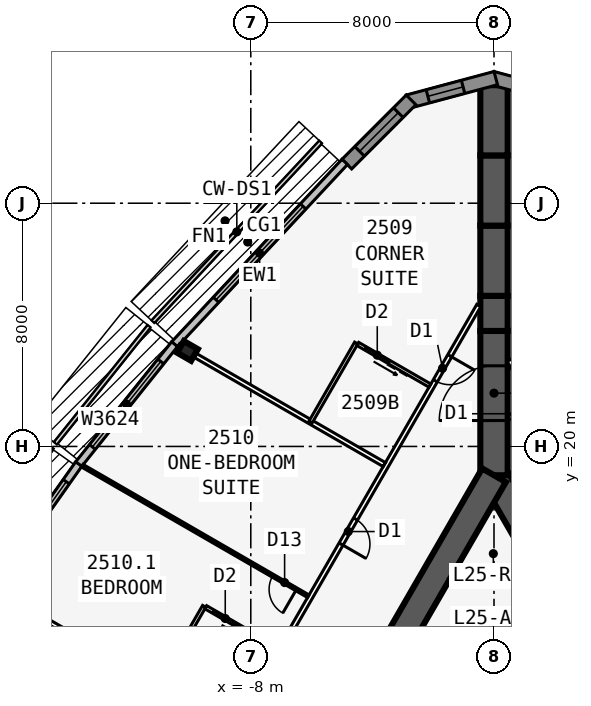
"""IFC4 building model, lengths in metres.
Left out: names, types, materials, properties, quantities, classifications, styles, units other than length and angle.
Written with IfcOpenShell. Run it as: python <this file> out.ifc"""

import sys

from ifc_helpers import new_model, si_unit, direction, frame, frame_2d, origin, origin_2d, place, context, subcontext, project, spatial, polyline, rectangle, i_section, outline, extrude, element, fill, save


model = new_model("IFC4")
c1 = context("Model", 3, precision=1e-05, world=origin(), true_north=direction((0.0, 1.0)))
c2 = subcontext(c1, "Body", "Model", "MODEL_VIEW")
j1 = project(units=[si_unit("LENGTHUNIT", "METRE"), si_unit("PLANEANGLEUNIT", "RADIAN")], contexts=[c1])
p1 = place(None, origin())
s1 = spatial("IfcSite", under=j1, at=p1, CompositionType="ELEMENT")
p2 = place(p1, origin())
s2 = spatial("IfcBuilding", under=s1, at=p2, CompositionType="ELEMENT")
p3 = place(p2, frame((0.0, 0.0, 96.5)))
s3 = spatial("IfcBuildingStorey", under=s2, at=p3, CompositionType="ELEMENT", Elevation=96.5)
p4 = place(p3, frame((16.5, -9.526, 0.0), z_axis=(0.0, 0.0, 1.0), x_axis=(-0.499999749417, 0.866025548458, 0.0)))
e1 = element("IfcWall", 1, at=p4, inside=s3, PredefinedType="SHEAR", context=c2, shape_type="SweptSolid", body=[
    extrude(rectangle(XDim=33.0, YDim=0.9, at=frame_2d((16.5, 0.0))), origin(), (0.0, 0.0, 1.0), 3.4),
])
p5 = place(p4, frame((14.15, 0.0, 0.0)))
e2 = element("IfcOpeningElement", 2, at=p5, cuts=e1, PredefinedType="OPENING", context=c2, shape_type="SweptSolid", body=[
    extrude(rectangle(XDim=1.8, YDim=2.13, at=frame_2d((0.9, 1.065))), frame((0.0, 0.46, 0.0), z_axis=(0.0, -1.0, 0.0), x_axis=(1.0, 0.0, 0.0)), (0.0, 0.0, 1.0), 0.92),
])
p6 = place(p4, frame((12.6, 0.0, 0.0)))
e3 = element("IfcOpeningElement", 3, at=p6, cuts=e1, PredefinedType="OPENING", context=c2, shape_type="SweptSolid", body=[
    extrude(rectangle(XDim=1.0, YDim=2.13, at=frame_2d((0.5, 1.065))), frame((0.0, 0.46, 0.0), z_axis=(0.0, -1.0, 0.0), x_axis=(1.0, 0.0, 0.0)), (0.0, 0.0, 1.0), 0.92),
])
p7 = place(p3, frame((0.0, 19.052, 0.0), z_axis=(0.0, 0.0, 1.0), x_axis=(-0.499999749417, -0.866025548458, 0.0)))
e4 = element("IfcWall", 4, at=p7, inside=s3, PredefinedType="SHEAR", context=c2, shape_type="SweptSolid", body=[
    extrude(rectangle(XDim=33.0, YDim=0.9, at=frame_2d((16.5, 0.0))), origin(), (0.0, 0.0, 1.0), 3.4),
])
p8 = place(p7, frame((14.15, 0.0, 0.0)))
e5 = element("IfcOpeningElement", 5, at=p8, cuts=e4, PredefinedType="OPENING", context=c2, shape_type="SweptSolid", body=[
    extrude(rectangle(XDim=1.8, YDim=2.13, at=frame_2d((0.9, 1.065))), frame((0.0, 0.46, 0.0), z_axis=(0.0, -1.0, 0.0), x_axis=(1.0, 0.0, 0.0)), (0.0, 0.0, 1.0), 0.92),
])
p9 = place(p7, frame((12.6, 0.0, 0.0)))
e6 = element("IfcOpeningElement", 6, at=p9, cuts=e4, PredefinedType="OPENING", context=c2, shape_type="SweptSolid", body=[
    extrude(rectangle(XDim=1.0, YDim=2.13, at=frame_2d((0.5, 1.065))), frame((0.0, 0.46, 0.0), z_axis=(0.0, -1.0, 0.0), x_axis=(1.0, 0.0, 0.0)), (0.0, 0.0, 1.0), 0.92),
])
p10 = place(p3, frame((0.0, 19.052, 0.0), z_axis=(0.0, 0.0, 1.0), x_axis=(0.0, 1.0, 0.0)))
e7 = element("IfcWall", 7, at=p10, inside=s3, PredefinedType="SHEAR", context=c2, shape_type="SweptSolid", body=[
    extrude(rectangle(XDim=4.746, YDim=0.9, at=frame_2d((2.373, 0.0))), origin(), (0.0, 0.0, 1.0), 3.4),
])
p11 = place(p10, frame((1.8, 0.0, 0.0)))
e8 = element("IfcOpeningElement", 8, at=p11, cuts=e7, PredefinedType="OPENING", context=c2, shape_type="SweptSolid", body=[
    extrude(rectangle(XDim=1.8, YDim=2.13, at=frame_2d((0.9, 1.065))), frame((0.0, 0.46, 0.0), z_axis=(0.0, -1.0, 0.0), x_axis=(1.0, 0.0, 0.0)), (0.0, 0.0, 1.0), 0.92),
])
p12 = place(p3, frame((0.0, 23.799, 0.0), z_axis=(0.0, 0.0, 1.0), x_axis=(0.0, 1.0, 0.0)))
e9 = element("IfcWall", 9, at=p12, inside=s3, PredefinedType="SHEAR", context=c2, shape_type="SweptSolid", body=[
    extrude(rectangle(XDim=1.155, YDim=0.9, at=frame_2d((0.577, 0.0))), origin(), (0.0, 0.0, 1.0), 3.4),
])
p13 = place(p3, frame((0.0, 24.953, 0.0), z_axis=(0.0, 0.0, 1.0), x_axis=(0.0, 1.0, 0.0)))
e10 = element("IfcWall", 10, at=p13, inside=s3, PredefinedType="SHEAR", context=c2, shape_type="SweptSolid", body=[
    extrude(rectangle(XDim=2.309, YDim=0.9, at=frame_2d((1.155, 0.0))), origin(), (0.0, 0.0, 1.0), 3.4),
])
p14 = place(p3, frame((0.0, 27.263, 0.0), z_axis=(0.0, 0.0, 1.0), x_axis=(0.0, 1.0, 0.0)))
e11 = element("IfcWall", 11, at=p14, inside=s3, PredefinedType="SHEAR", context=c2, shape_type="SweptSolid", body=[
    extrude(rectangle(XDim=2.31, YDim=0.9, at=frame_2d((1.155, 0.0))), origin(), (0.0, 0.0, 1.0), 3.4),
])
p15 = place(p3, frame((0.0, 29.572, 0.0), z_axis=(0.0, 0.0, 1.0), x_axis=(0.0, 1.0, 0.0)))
e12 = element("IfcWall", 12, at=p15, inside=s3, PredefinedType="SHEAR", context=c2, shape_type="SweptSolid", body=[
    extrude(rectangle(XDim=2.309, YDim=0.9, at=frame_2d((1.155, 0.0))), origin(), (0.0, 0.0, 1.0), 3.4),
])
p16 = place(p3, frame((-10.083, 23.142, 0.0), z_axis=(0.0, 0.0, 1.0), x_axis=(-0.5, -0.866025403784, 0.0)))
e13 = element("IfcColumn", 13, at=p16, inside=s3, PredefinedType="COLUMN", context=c2, shape_type="SweptSolid", body=[
    extrude(i_section(OverallWidth=0.442, OverallDepth=0.531, WebThickness=0.066, FlangeThickness=0.106, at=origin_2d()), origin(), (0.0, 0.0, 1.0), 3.4),
])
p17 = place(p3, frame((2.829, 31.341, 0.0), z_axis=(0.0, 0.0, 1.0), x_axis=(-0.965930548995, 0.258801419081, 0.0)))
e14 = element("IfcWall", 14, at=p17, inside=s3, PredefinedType="SOLIDWALL", context=c2, shape_type="SweptSolid", body=[
    extrude(outline(polyline([(2.989, 0.225), (2.929, 0.225), (2.438, 0.093), (2.402, 0.225), (0.0, 0.225), (0.0, -0.225), (2.989, -0.225), (2.989, 0.225)])), origin(), (0.0, 0.0, 1.0), 3.235),
])
p18 = place(p17, frame((0.676, 0.0, 0.45)))
e15 = element("IfcOpeningElement", 15, at=p18, cuts=e14, PredefinedType="OPENING", context=c2, shape_type="SweptSolid", body=[
    extrude(rectangle(XDim=1.2, YDim=2.4, at=frame_2d((0.6, 1.2))), frame((0.0, 0.235, 0.0), z_axis=(0.0, -1.0, 0.0), x_axis=(1.0, 0.0, 0.0)), (0.0, 0.0, 1.0), 0.47),
])
p19 = place(p3, frame((0.058, 32.114, 0.0), z_axis=(0.0, 0.0, 1.0), x_axis=(-0.965930548995, -0.258801419081, 0.0)))
e16 = element("IfcWall", 16, at=p19, inside=s3, PredefinedType="SOLIDWALL", context=c2, shape_type="SweptSolid", body=[
    extrude(outline(polyline([(2.989, 0.225), (0.586, 0.225), (0.551, 0.093), (0.059, 0.225), (0.0, 0.225), (0.0, -0.225), (2.989, -0.225), (2.989, 0.225)])), origin(), (0.0, 0.0, 1.0), 3.235),
])
p20 = place(p19, frame((1.113, 0.0, 0.45)))
e17 = element("IfcOpeningElement", 17, at=p20, cuts=e16, PredefinedType="OPENING", context=c2, shape_type="SweptSolid", body=[
    extrude(rectangle(XDim=1.2, YDim=2.4, at=frame_2d((0.6, 1.2))), frame((0.0, 0.235, 0.0), z_axis=(0.0, -1.0, 0.0), x_axis=(1.0, 0.0, 0.0)), (0.0, 0.0, 1.0), 0.47),
])
p21 = place(p3, frame((-2.728, 31.399, 0.0), z_axis=(0.0, 0.0, 1.0), x_axis=(-0.707106781187, -0.707106781187, 0.0)))
e18 = element("IfcWall", 18, at=p21, inside=s3, PredefinedType="SOLIDWALL", context=c2, shape_type="SweptSolid", body=[
    extrude(rectangle(XDim=2.988, YDim=0.45, at=frame_2d((1.494, 0.0))), origin(), (0.0, 0.0, 1.0), 3.235),
])
p22 = place(p21, frame((0.594, 0.0, 0.45)))
e19 = element("IfcOpeningElement", 19, at=p22, cuts=e18, PredefinedType="OPENING", context=c2, shape_type="SweptSolid", body=[
    extrude(rectangle(XDim=1.8, YDim=2.4, at=frame_2d((0.9, 1.2))), frame((0.0, 0.235, 0.0), z_axis=(0.0, -1.0, 0.0), x_axis=(1.0, 0.0, 0.0)), (0.0, 0.0, 1.0), 0.47),
])
p23 = place(p3, frame((-4.909, 29.36, 0.0), z_axis=(0.0, 0.0, 1.0), x_axis=(-0.682289646561, -0.731081964075, 0.0)))
e20 = element("IfcWall", 20, at=p23, inside=s3, PredefinedType="STANDARD", context=c2, shape_type="SweptSolid", body=[
    extrude(rectangle(XDim=8.211, YDim=0.25, at=frame_2d((4.105, 0.0))), origin(), (0.0, 0.0, 1.0), 3.235),
])
p24 = place(p23, frame((2.006, 0.0, 0.45)))
e21 = element("IfcOpeningElement", 21, at=p24, cuts=e20, PredefinedType="OPENING", context=c2, shape_type="SweptSolid", body=[
    extrude(rectangle(XDim=4.2, YDim=2.4, at=frame_2d((2.1, 1.2))), frame((0.0, 0.135, 0.0), z_axis=(0.0, -1.0, 0.0), x_axis=(1.0, 0.0, 0.0)), (0.0, 0.0, 1.0), 0.27),
])
p25 = place(p3, frame((-10.505, 23.364, 0.0), z_axis=(0.0, 0.0, 1.0), x_axis=(-0.624594965756, -0.780948864364, 0.0)))
e22 = element("IfcWall", 22, at=p25, inside=s3, PredefinedType="STANDARD", context=c2, shape_type="SweptSolid", body=[
    extrude(rectangle(XDim=5.058, YDim=0.25, at=frame_2d((2.529, 0.0))), origin(), (0.0, 0.0, 1.0), 3.235),
])
p26 = place(p25, frame((0.729, 0.0, 0.45)))
e23 = element("IfcOpeningElement", 23, at=p26, cuts=e22, PredefinedType="OPENING", context=c2, shape_type="SweptSolid", body=[
    extrude(rectangle(XDim=3.6, YDim=2.4, at=frame_2d((1.8, 1.2))), frame((0.0, 0.135, 0.0), z_axis=(0.0, -1.0, 0.0), x_axis=(1.0, 0.0, 0.0)), (0.0, 0.0, 1.0), 0.27),
])
p27 = place(p3, frame((-13.659, 19.42, 0.0), z_axis=(0.0, 0.0, 1.0), x_axis=(-0.5766431066, -0.81699616132, 0.0)))
e24 = element("IfcWall", 24, at=p27, inside=s3, PredefinedType="STANDARD", context=c2, shape_type="SweptSolid", body=[
    extrude(rectangle(XDim=5.021, YDim=0.25, at=frame_2d((2.51, 0.0))), origin(), (0.0, 0.0, 1.0), 3.235),
])
p28 = place(p27, frame((0.71, 0.0, 0.45)))
e25 = element("IfcOpeningElement", 25, at=p28, cuts=e24, PredefinedType="OPENING", context=c2, shape_type="SweptSolid", body=[
    extrude(rectangle(XDim=3.6, YDim=2.4, at=frame_2d((1.8, 1.2))), frame((0.0, 0.135, 0.0), z_axis=(0.0, -1.0, 0.0), x_axis=(1.0, 0.0, 0.0)), (0.0, 0.0, 1.0), 0.27),
])
p29 = place(p3, frame((20.027, -10.985, 0.0), z_axis=(0.0, 0.0, 1.0), x_axis=(-0.500001677587, 0.866024435227, 0.0)))
e26 = element("IfcWall", 26, at=p29, inside=s3, PredefinedType="PARTITIONING", context=c2, shape_type="SweptSolid", body=[
    extrude(rectangle(XDim=39.054, YDim=0.15, at=frame_2d((19.527, 0.0))), origin(), (0.0, 0.0, 1.0), 3.235),
])
p30 = place(p29, frame((1.558, 0.0, 0.0)))
e27 = element("IfcOpeningElement", 27, at=p30, cuts=e26, PredefinedType="OPENING", context=c2, shape_type="SweptSolid", body=[
    extrude(rectangle(XDim=0.95, YDim=2.13, at=frame_2d((0.475, 1.065))), frame((0.0, 0.085, 0.0), z_axis=(0.0, -1.0, 0.0), x_axis=(1.0, 0.0, 0.0)), (0.0, 0.0, 1.0), 0.17),
])
p31 = place(p29, frame((11.552, 0.0, 0.0)))
e28 = element("IfcOpeningElement", 28, at=p31, cuts=e26, PredefinedType="OPENING", context=c2, shape_type="SweptSolid", body=[
    extrude(rectangle(XDim=0.95, YDim=2.13, at=frame_2d((0.475, 1.065))), frame((0.0, 0.085, 0.0), z_axis=(0.0, -1.0, 0.0), x_axis=(1.0, 0.0, 0.0)), (0.0, 0.0, 1.0), 0.17),
])
p32 = place(p29, frame((22.752, 0.0, 0.0)))
e29 = element("IfcOpeningElement", 29, at=p32, cuts=e26, PredefinedType="OPENING", context=c2, shape_type="SweptSolid", body=[
    extrude(rectangle(XDim=0.95, YDim=2.13, at=frame_2d((0.475, 1.065))), frame((0.0, 0.085, 0.0), z_axis=(0.0, -1.0, 0.0), x_axis=(1.0, 0.0, 0.0)), (0.0, 0.0, 1.0), 0.17),
])
p33 = place(p29, frame((36.546, 0.0, 0.0)))
e30 = element("IfcOpeningElement", 30, at=p33, cuts=e26, PredefinedType="OPENING", context=c2, shape_type="SweptSolid", body=[
    extrude(rectangle(XDim=0.95, YDim=2.13, at=frame_2d((0.475, 1.065))), frame((0.0, 0.085, 0.0), z_axis=(0.0, -1.0, 0.0), x_axis=(1.0, 0.0, 0.0)), (0.0, 0.0, 1.0), 0.17),
])
p34 = place(p3, frame((-0.5, 24.636, 0.0), z_axis=(0.0, 0.0, 1.0), x_axis=(-0.500001915564, -0.86602429783, 0.0)))
e31 = element("IfcWall", 31, at=p34, inside=s3, PredefinedType="PARTITIONING", context=c2, shape_type="SweptSolid", body=[
    extrude(rectangle(XDim=42.172, YDim=0.15, at=frame_2d((21.086, 0.0))), origin(), (0.0, 0.0, 1.0), 3.235),
])
p35 = place(p34, frame((1.911, 0.0, 0.0)))
e32 = element("IfcOpeningElement", 32, at=p35, cuts=e31, PredefinedType="OPENING", context=c2, shape_type="SweptSolid", body=[
    extrude(rectangle(XDim=0.95, YDim=2.13, at=frame_2d((0.475, 1.065))), frame((0.0, 0.085, 0.0), z_axis=(0.0, -1.0, 0.0), x_axis=(1.0, 0.0, 0.0)), (0.0, 0.0, 1.0), 0.17),
])
p36 = place(p34, frame((8.111, 0.0, 0.0)))
e33 = element("IfcOpeningElement", 33, at=p36, cuts=e31, PredefinedType="OPENING", context=c2, shape_type="SweptSolid", body=[
    extrude(rectangle(XDim=0.95, YDim=2.13, at=frame_2d((0.475, 1.065))), frame((0.0, 0.085, 0.0), z_axis=(0.0, -1.0, 0.0), x_axis=(1.0, 0.0, 0.0)), (0.0, 0.0, 1.0), 0.17),
])
p37 = place(p34, frame((18.111, 0.0, 0.0)))
e34 = element("IfcOpeningElement", 34, at=p37, cuts=e31, PredefinedType="OPENING", context=c2, shape_type="SweptSolid", body=[
    extrude(rectangle(XDim=0.95, YDim=2.13, at=frame_2d((0.475, 1.065))), frame((0.0, 0.085, 0.0), z_axis=(0.0, -1.0, 0.0), x_axis=(1.0, 0.0, 0.0)), (0.0, 0.0, 1.0), 0.17),
])
p38 = place(p34, frame((28.711, 0.0, 0.0)))
e35 = element("IfcOpeningElement", 35, at=p38, cuts=e31, PredefinedType="OPENING", context=c2, shape_type="SweptSolid", body=[
    extrude(rectangle(XDim=0.95, YDim=2.13, at=frame_2d((0.475, 1.065))), frame((0.0, 0.085, 0.0), z_axis=(0.0, -1.0, 0.0), x_axis=(1.0, 0.0, 0.0)), (0.0, 0.0, 1.0), 0.17),
])
p39 = place(p34, frame((33.711, 0.0, 0.0)))
e36 = element("IfcOpeningElement", 36, at=p39, cuts=e31, PredefinedType="OPENING", context=c2, shape_type="SweptSolid", body=[
    extrude(rectangle(XDim=0.95, YDim=2.13, at=frame_2d((0.475, 1.065))), frame((0.0, 0.085, 0.0), z_axis=(0.0, -1.0, 0.0), x_axis=(1.0, 0.0, 0.0)), (0.0, 0.0, 1.0), 0.17),
])
p40 = place(p34, frame((39.311, 0.0, 0.0)))
e37 = element("IfcOpeningElement", 37, at=p40, cuts=e31, PredefinedType="OPENING", context=c2, shape_type="SweptSolid", body=[
    extrude(rectangle(XDim=0.95, YDim=2.13, at=frame_2d((0.475, 1.065))), frame((0.0, 0.085, 0.0), z_axis=(0.0, -1.0, 0.0), x_axis=(1.0, 0.0, 0.0)), (0.0, 0.0, 1.0), 0.17),
])
p41 = place(p3, frame((-3.608, 19.404, 0.0), z_axis=(0.0, 0.0, 1.0), x_axis=(-0.866021300503, 0.500007107024, 0.0)))
e38 = element("IfcWall", 38, at=p41, inside=s3, PredefinedType="PARTITIONING", context=c2, shape_type="SweptSolid", body=[
    extrude(rectangle(XDim=7.82, YDim=0.15, at=frame_2d((3.91, 0.0))), origin(), (0.0, 0.0, 1.0), 2.389),
])
p42 = place(p3, frame((-6.108, 15.073, 0.0), z_axis=(0.0, 0.0, 1.0), x_axis=(-0.866031196456, 0.499989966665, 0.0)))
e39 = element("IfcWall", 39, at=p42, inside=s3, PredefinedType="PARTITIONING", context=c2, shape_type="SweptSolid", body=[
    extrude(rectangle(XDim=8.585, YDim=0.1, at=frame_2d((4.292, 0.0))), origin(), (0.0, 0.0, 1.0), 2.389),
])
p43 = place(p42, frame((0.45, 0.0, 0.0)))
e40 = element("IfcOpeningElement", 40, at=p43, cuts=e39, PredefinedType="OPENING", context=c2, shape_type="SweptSolid", body=[
    extrude(rectangle(XDim=0.9, YDim=2.13, at=frame_2d((0.45, 1.065))), frame((0.0, 0.06, 0.0), z_axis=(0.0, -1.0, 0.0), x_axis=(1.0, 0.0, 0.0)), (0.0, 0.0, 1.0), 0.12),
])
p44 = place(p3, frame((-8.608, 10.743, 0.0), z_axis=(0.0, 0.0, 1.0), x_axis=(-0.866028232062, 0.499995101247, 0.0)))
e41 = element("IfcWall", 41, at=p44, inside=s3, PredefinedType="PARTITIONING", context=c2, shape_type="SweptSolid", body=[
    extrude(rectangle(XDim=9.043, YDim=0.15, at=frame_2d((4.521, 0.0))), origin(), (0.0, 0.0, 1.0), 2.389),
])
p45 = place(p3, frame((-4.533, 23.402, 0.0), z_axis=(0.0, 0.0, 1.0), x_axis=(-0.499990139034, -0.866031096941, 0.0)))
e42 = element("IfcWall", 42, at=p45, inside=s3, PredefinedType="PLUMBINGWALL", context=c2, shape_type="SweptSolid", body=[
    extrude(rectangle(XDim=3.0, YDim=0.12, at=frame_2d((1.5, 0.0))), origin(), (0.0, 0.0, 1.0), 3.235),
])
p46 = place(p3, frame((-2.108, 22.002, 0.0), z_axis=(0.0, 0.0, 1.0), x_axis=(-0.866035715982, 0.499982138324, 0.0)))
e43 = element("IfcWall", 43, at=p46, inside=s3, PredefinedType="PLUMBINGWALL", context=c2, shape_type="SweptSolid", body=[
    extrude(rectangle(XDim=2.74, YDim=0.12, at=frame_2d((1.37, 0.0))), origin(), (0.0, 0.0, 1.0), 3.235),
])
p47 = place(p46, frame((1.55, 0.0, 0.0)))
e44 = element("IfcOpeningElement", 44, at=p47, cuts=e43, PredefinedType="OPENING", context=c2, shape_type="SweptSolid", body=[
    extrude(rectangle(XDim=0.9, YDim=2.13, at=frame_2d((0.45, 1.065))), frame((0.0, 0.07, 0.0), z_axis=(0.0, -1.0, 0.0), x_axis=(1.0, 0.0, 0.0)), (0.0, 0.0, 1.0), 0.14),
])
p48 = place(p3, frame((-9.533, 14.741, 0.0), z_axis=(0.0, 0.0, 1.0), x_axis=(-0.50002537861, -0.866010750942, 0.0)))
e45 = element("IfcWall", 45, at=p48, inside=s3, PredefinedType="PLUMBINGWALL", context=c2, shape_type="SweptSolid", body=[
    extrude(rectangle(XDim=3.0, YDim=0.12, at=frame_2d((1.5, 0.0))), origin(), (0.0, 0.0, 1.0), 3.235),
])
p49 = place(p3, frame((-7.108, 13.341, 0.0), z_axis=(0.0, 0.0, 1.0), x_axis=(-0.866035715982, 0.499982138324, 0.0)))
e46 = element("IfcWall", 46, at=p49, inside=s3, PredefinedType="PLUMBINGWALL", context=c2, shape_type="SweptSolid", body=[
    extrude(rectangle(XDim=2.74, YDim=0.12, at=frame_2d((1.37, 0.0))), origin(), (0.0, 0.0, 1.0), 3.235),
])
p50 = place(p49, frame((1.55, 0.0, 0.0)))
e47 = element("IfcOpeningElement", 47, at=p50, cuts=e46, PredefinedType="OPENING", context=c2, shape_type="SweptSolid", body=[
    extrude(rectangle(XDim=0.9, YDim=2.13, at=frame_2d((0.45, 1.065))), frame((0.0, 0.07, 0.0), z_axis=(0.0, -1.0, 0.0), x_axis=(1.0, 0.0, 0.0)), (0.0, 0.0, 1.0), 0.14),
])
p51 = place(p3, frame((-1.501, 15.552, 0.0), z_axis=(0.0, 0.0, 1.0), x_axis=(1.0, 0.0, 0.0)))
e48 = element("IfcWall", 48, at=p51, inside=s3, PredefinedType="SOLIDWALL", context=c2, shape_type="SweptSolid", body=[
    extrude(rectangle(XDim=3.002, YDim=0.2, at=frame_2d((1.501, 0.0))), origin(), (0.0, 0.0, 1.0), 3.235),
])
p52 = place(p20, origin())
e49 = element("IfcWindow", 49, at=p52, inside=s3, PartitioningType="SINGLE_PANEL", PredefinedType="WINDOW", context=c2, shape_type="SweptSolid", body=[
    extrude(rectangle(XDim=1.2, YDim=2.4, at=frame_2d((0.6, 1.2))), frame((0.0, 0.03, 0.0), z_axis=(0.0, -1.0, 0.0), x_axis=(1.0, 0.0, 0.0)), (0.0, 0.0, 1.0), 0.06),
])
fill(e17, e49)
p53 = place(p22, origin())
e50 = element("IfcWindow", 50, at=p53, inside=s3, PartitioningType="SINGLE_PANEL", PredefinedType="WINDOW", context=c2, shape_type="SweptSolid", body=[
    extrude(rectangle(XDim=1.8, YDim=2.4, at=frame_2d((0.9, 1.2))), frame((0.0, 0.03, 0.0), z_axis=(0.0, -1.0, 0.0), x_axis=(1.0, 0.0, 0.0)), (0.0, 0.0, 1.0), 0.06),
])
fill(e19, e50)
p54 = place(p24, origin())
e51 = element("IfcWindow", 51, at=p54, inside=s3, PartitioningType="SINGLE_PANEL", PredefinedType="WINDOW", context=c2, shape_type="SweptSolid", body=[
    extrude(rectangle(XDim=4.2, YDim=2.4, at=frame_2d((2.1, 1.2))), frame((0.0, 0.03, 0.0), z_axis=(0.0, -1.0, 0.0), x_axis=(1.0, 0.0, 0.0)), (0.0, 0.0, 1.0), 0.06),
])
fill(e21, e51)
p55 = place(p26, origin())
e52 = element("IfcWindow", 52, at=p55, inside=s3, PartitioningType="SINGLE_PANEL", PredefinedType="WINDOW", context=c2, shape_type="SweptSolid", body=[
    extrude(rectangle(XDim=3.6, YDim=2.4, at=frame_2d((1.8, 1.2))), frame((0.0, 0.03, 0.0), z_axis=(0.0, -1.0, 0.0), x_axis=(1.0, 0.0, 0.0)), (0.0, 0.0, 1.0), 0.06),
])
fill(e23, e52)
p56 = place(p28, origin())
e53 = element("IfcWindow", 53, at=p56, inside=s3, PartitioningType="SINGLE_PANEL", PredefinedType="WINDOW", context=c2, shape_type="SweptSolid", body=[
    extrude(rectangle(XDim=3.6, YDim=2.4, at=frame_2d((1.8, 1.2))), frame((0.0, 0.03, 0.0), z_axis=(0.0, -1.0, 0.0), x_axis=(1.0, 0.0, 0.0)), (0.0, 0.0, 1.0), 0.06),
])
fill(e25, e53)
p57 = place(p43, origin())
e54 = element("IfcDoor", 54, at=p57, inside=s3, OperationType="SINGLE_SWING_LEFT", PredefinedType="DOOR", context=c2, shape_type="SweptSolid", body=[
    extrude(rectangle(XDim=0.9, YDim=2.13, at=frame_2d((0.45, 1.065))), frame((0.0, 0.025, 0.0), z_axis=(0.0, -1.0, 0.0), x_axis=(1.0, 0.0, 0.0)), (0.0, 0.0, 1.0), 0.05),
])
fill(e40, e54)
p58 = place(p47, origin())
e55 = element("IfcDoor", 55, at=p58, inside=s3, OperationType="SLIDING_TO_LEFT", PredefinedType="DOOR", context=c2, shape_type="SweptSolid", body=[
    extrude(rectangle(XDim=0.9, YDim=2.13, at=frame_2d((0.45, 1.065))), frame((0.0, 0.025, 0.0), z_axis=(0.0, -1.0, 0.0), x_axis=(1.0, 0.0, 0.0)), (0.0, 0.0, 1.0), 0.05),
])
fill(e44, e55)
p59 = place(p35, origin())
e56 = element("IfcDoor", 56, at=p59, inside=s3, OperationType="SINGLE_SWING_LEFT", PredefinedType="DOOR", context=c2, shape_type="SweptSolid", body=[
    extrude(rectangle(XDim=0.95, YDim=2.13, at=frame_2d((0.475, 1.065))), frame((0.0, 0.025, 0.0), z_axis=(0.0, -1.0, 0.0), x_axis=(1.0, 0.0, 0.0)), (0.0, 0.0, 1.0), 0.05),
])
fill(e32, e56)
p60 = place(p36, origin())
e57 = element("IfcDoor", 57, at=p60, inside=s3, OperationType="SINGLE_SWING_RIGHT", PredefinedType="DOOR", context=c2, shape_type="SweptSolid", body=[
    extrude(rectangle(XDim=0.95, YDim=2.13, at=frame_2d((0.475, 1.065))), frame((0.0, 0.025, 0.0), z_axis=(0.0, -1.0, 0.0), x_axis=(1.0, 0.0, 0.0)), (0.0, 0.0, 1.0), 0.05),
])
fill(e33, e57)
p61 = place(p50, origin())
e58 = element("IfcDoor", 58, at=p61, inside=s3, OperationType="SLIDING_TO_LEFT", PredefinedType="DOOR", context=c2, shape_type="SweptSolid", body=[
    extrude(rectangle(XDim=0.9, YDim=2.13, at=frame_2d((0.45, 1.065))), frame((0.0, 0.025, 0.0), z_axis=(0.0, -1.0, 0.0), x_axis=(1.0, 0.0, 0.0)), (0.0, 0.0, 1.0), 0.05),
])
fill(e47, e58)
p62 = place(p11, origin())
e59 = element("IfcDoor", 59, at=p62, inside=s3, OperationType="DOUBLE_DOOR_DOUBLE_SWING", PredefinedType="DOOR", context=c2, shape_type="SweptSolid", body=[
    extrude(rectangle(XDim=1.8, YDim=2.13, at=frame_2d((0.9, 1.065))), frame((0.0, 0.025, 0.0), z_axis=(0.0, -1.0, 0.0), x_axis=(1.0, 0.0, 0.0)), (0.0, 0.0, 1.0), 0.05),
])
fill(e8, e59)
save(model, sys.argv[1])
